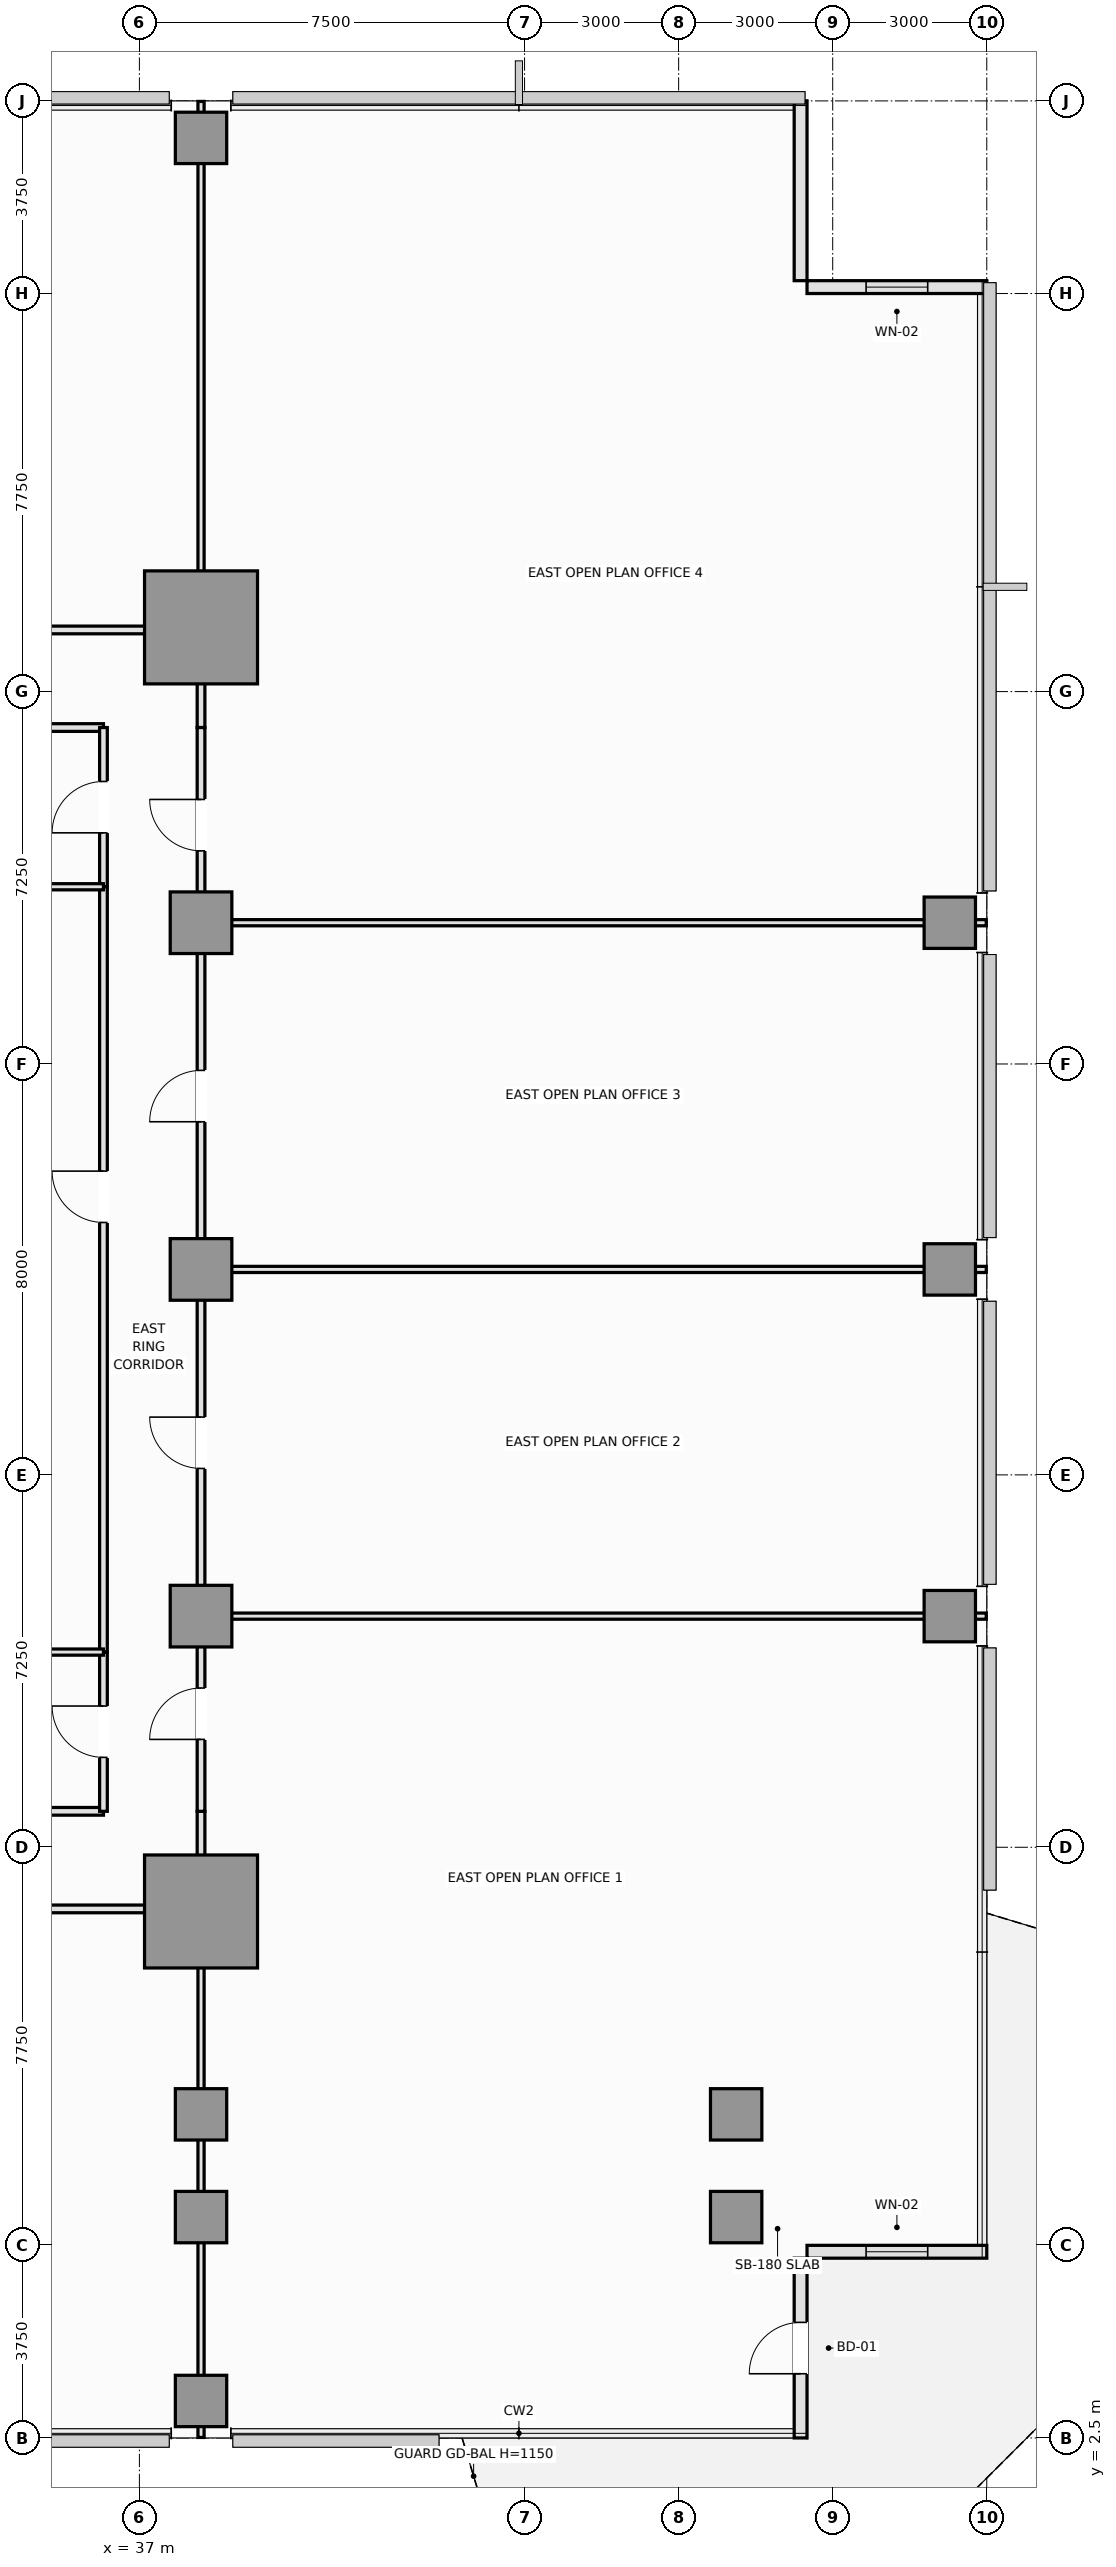
"""IFC4 building model, lengths in metres.
Left out: names, types, materials, properties, quantities, classifications, styles, units other than length and angle.
Written with IfcOpenShell. Run it as: python <this file> out.ifc"""

import sys

from ifc_helpers import new_model, si_unit, direction, frame, frame_2d, origin, origin_2d, place, context, subcontext, project, spatial, rectangle, extrude, element, fill, save


model = new_model("IFC4")
c1 = context("Model", 3, precision=1e-05, world=origin(), true_north=direction((0.0, 1.0)))
c2 = subcontext(c1, "Body", "Model", "MODEL_VIEW")
j1 = project(units=[si_unit("LENGTHUNIT", "METRE"), si_unit("PLANEANGLEUNIT", "RADIAN")], contexts=[c1])
p1 = place(None, origin())
s1 = spatial("IfcSite", under=j1, at=p1, CompositionType="ELEMENT")
p2 = place(p1, origin())
s2 = spatial("IfcBuilding", under=s1, at=p2, CompositionType="ELEMENT")
p3 = place(p2, frame((0.0, 0.0, 29.15)))
s3 = spatial("IfcBuildingStorey", under=s2, at=p3, CompositionType="ELEMENT", Elevation=29.15)
for number, where, z_axis, x_axis in (
    (1, (38.2, 12.75, 0.0), (0.0, 0.0, 1.0), (1.0, 0.0, 0.0)),
    (2, (38.2, 37.75, 0.0), (0.0, 0.0, 1.0), (1.0, 0.0, 0.0)),
):
    element("IfcColumn", number, at=place(p3, frame(where, z_axis=z_axis, x_axis=x_axis)), inside=s3, PredefinedType="COLUMN", context=c2, shape_type="SweptSolid", body=[
        extrude(rectangle(XDim=2.2, YDim=2.2, at=origin_2d()), origin(), (0.0, 0.0, 1.0), 3.55),
    ])
for number, where, z_axis, x_axis in (
    (3, (38.2, 18.5, 0.0), (0.0, 0.0, 1.0), (1.0, 0.0, 0.0)),
    (4, (38.2, 25.25, 0.0), (0.0, 0.0, 1.0), (1.0, 0.0, 0.0)),
    (5, (38.2, 32.0, 0.0), (0.0, 0.0, 1.0), (1.0, 0.0, 0.0)),
):
    element("IfcColumn", number, at=place(p3, frame(where, z_axis=z_axis, x_axis=x_axis)), inside=s3, PredefinedType="COLUMN", context=c2, shape_type="SweptSolid", body=[
        extrude(rectangle(XDim=1.2, YDim=1.2, at=origin_2d()), origin(), (0.0, 0.0, 1.0), 3.55),
    ])
for number, where, z_axis, x_axis in (
    (6, (48.62, 6.8, 0.0), (0.0, 0.0, 1.0), (1.0, 0.0, 0.0)),
    (7, (38.2, 6.8, 0.0), (0.0, 0.0, 1.0), (1.0, 0.0, 0.0)),
    (8, (38.2, 8.8, 0.0), (0.0, 0.0, 1.0), (1.0, 0.0, 0.0)),
    (9, (48.62, 8.8, 0.0), (0.0, 0.0, 1.0), (1.0, 0.0, 0.0)),
    (10, (52.78, 18.5, 0.0), (0.0, 0.0, 1.0), (1.0, 0.0, 0.0)),
    (11, (52.78, 25.25, 0.0), (0.0, 0.0, 1.0), (1.0, 0.0, 0.0)),
    (12, (52.78, 32.0, 0.0), (0.0, 0.0, 1.0), (1.0, 0.0, 0.0)),
    (13, (38.2, 3.22, 0.0), (0.0, 0.0, 1.0), (1.0, 0.0, 0.0)),
    (14, (38.2, 47.28, 0.0), (0.0, 0.0, 1.0), (1.0, 0.0, 0.0)),
):
    element("IfcColumn", number, at=place(p3, frame(where, z_axis=z_axis, x_axis=x_axis)), inside=s3, PredefinedType="COLUMN", context=c2, shape_type="SweptSolid", body=[
        extrude(rectangle(XDim=1.0, YDim=1.0, at=origin_2d()), origin(), (0.0, 0.0, 1.0), 3.55),
    ])
p4 = place(p3, frame((49.875, 2.5, 0.0), z_axis=(0.0, 0.0, 1.0), x_axis=(0.0, 1.0, 0.0)))
e15 = element("IfcWall", 15, at=p4, inside=s3, PredefinedType="SOLIDWALL", context=c2, shape_type="SweptSolid", body=[
    extrude(rectangle(XDim=3.5, YDim=0.25, at=frame_2d((1.75, 0.0))), origin(), (0.0, 0.0, 1.0), 3.07),
])
p5 = place(p4, frame((1.25, 0.0, 0.0)))
e16 = element("IfcOpeningElement", 16, at=p5, cuts=e15, PredefinedType="OPENING", context=c2, shape_type="SweptSolid", body=[
    extrude(rectangle(XDim=1.0, YDim=2.2, at=frame_2d((0.5, 1.1))), frame((0.0, 0.135, 0.0), z_axis=(0.0, -1.0, 0.0), x_axis=(1.0, 0.0, 0.0)), (0.0, 0.0, 1.0), 0.27),
])
p6 = place(p3, frame((50.0, 6.125, 0.0), z_axis=(0.0, 0.0, 1.0), x_axis=(1.0, 0.0, 0.0)))
e17 = element("IfcWall", 17, at=p6, inside=s3, PredefinedType="SOLIDWALL", context=c2, shape_type="SweptSolid", body=[
    extrude(rectangle(XDim=3.5, YDim=0.25, at=frame_2d((1.75, 0.0))), origin(), (0.0, 0.0, 1.0), 3.07),
])
p7 = place(p6, frame((1.15, 0.0, 0.9)))
e18 = element("IfcOpeningElement", 18, at=p7, cuts=e17, PredefinedType="OPENING", context=c2, shape_type="SweptSolid", body=[
    extrude(rectangle(XDim=1.2, YDim=1.8, at=frame_2d((0.6, 0.9))), frame((0.0, 0.135, 0.0), z_axis=(0.0, -1.0, 0.0), x_axis=(1.0, 0.0, 0.0)), (0.0, 0.0, 1.0), 0.27),
])
p8 = place(p3, frame((53.5, 44.375, 0.0), z_axis=(0.0, 0.0, 1.0), x_axis=(-1.0, 0.0, 0.0)))
e19 = element("IfcWall", 19, at=p8, inside=s3, PredefinedType="SOLIDWALL", context=c2, shape_type="SweptSolid", body=[
    extrude(rectangle(XDim=3.5, YDim=0.25, at=frame_2d((1.75, 0.0))), origin(), (0.0, 0.0, 1.0), 3.37),
])
p9 = place(p8, frame((1.15, 0.0, 0.9)))
e20 = element("IfcOpeningElement", 20, at=p9, cuts=e19, PredefinedType="OPENING", context=c2, shape_type="SweptSolid", body=[
    extrude(rectangle(XDim=1.2, YDim=1.8, at=frame_2d((0.6, 0.9))), frame((0.0, 0.135, 0.0), z_axis=(0.0, -1.0, 0.0), x_axis=(1.0, 0.0, 0.0)), (0.0, 0.0, 1.0), 0.27),
])
p10 = place(p3, frame((49.875, 44.5, 0.0), z_axis=(0.0, 0.0, 1.0), x_axis=(0.0, 1.0, 0.0)))
e21 = element("IfcWall", 21, at=p10, inside=s3, PredefinedType="SOLIDWALL", context=c2, shape_type="SweptSolid", body=[
    extrude(rectangle(XDim=3.5, YDim=0.25, at=frame_2d((1.75, 0.0))), origin(), (0.0, 0.0, 1.0), 3.37),
])
p11 = place(p3, frame((29.8, 14.7, 0.0), z_axis=(0.0, 0.0, 1.0), x_axis=(1.0, 0.0, 0.0)))
e22 = element("IfcWall", 22, at=p11, inside=s3, PredefinedType="PARTITIONING", context=c2, shape_type="SweptSolid", body=[
    extrude(rectangle(XDim=6.5, YDim=0.15, at=frame_2d((3.25, 0.0))), origin(), (0.0, 0.0, 1.0), 3.37),
])
p12 = place(p3, frame((27.5, 12.8, 0.0), z_axis=(0.0, 0.0, 1.0), x_axis=(1.0, 0.0, 0.0)))
e23 = element("IfcWall", 23, at=p12, inside=s3, PredefinedType="PARTITIONING", context=c2, shape_type="SweptSolid", body=[
    extrude(rectangle(XDim=10.7, YDim=0.15, at=frame_2d((5.35, 0.0))), origin(), (0.0, 0.0, 1.0), 2.72),
])
p13 = place(p12, frame((4.85, 0.0, 0.0)))
e24 = element("IfcOpeningElement", 24, at=p13, cuts=e23, PredefinedType="OPENING", context=c2, shape_type="SweptSolid", body=[
    extrude(rectangle(XDim=1.0, YDim=2.15, at=frame_2d((0.5, 1.075))), frame((0.0, 0.085, 0.0), z_axis=(0.0, -1.0, 0.0), x_axis=(1.0, 0.0, 0.0)), (0.0, 0.0, 1.0), 0.17),
])
p14 = place(p3, frame((38.2, 12.8, 0.0), z_axis=(0.0, 0.0, 1.0), x_axis=(0.0, 1.0, 0.0)))
e25 = element("IfcWall", 25, at=p14, inside=s3, PredefinedType="PARTITIONING", context=c2, shape_type="SweptSolid", body=[
    extrude(rectangle(XDim=1.9, YDim=0.15, at=frame_2d((0.95, 0.0))), origin(), (0.0, 0.0, 1.0), 2.82),
])
p15 = place(p3, frame((29.8, 35.8, 0.0), z_axis=(0.0, 0.0, 1.0), x_axis=(1.0, 0.0, 0.0)))
e26 = element("IfcWall", 26, at=p15, inside=s3, PredefinedType="PARTITIONING", context=c2, shape_type="SweptSolid", body=[
    extrude(rectangle(XDim=6.5, YDim=0.15, at=frame_2d((3.25, 0.0))), origin(), (0.0, 0.0, 1.0), 3.37),
])
p16 = place(p3, frame((27.5, 37.7, 0.0), z_axis=(0.0, 0.0, 1.0), x_axis=(1.0, 0.0, 0.0)))
e27 = element("IfcWall", 27, at=p16, inside=s3, PredefinedType="PARTITIONING", context=c2, shape_type="SweptSolid", body=[
    extrude(rectangle(XDim=10.7, YDim=0.15, at=frame_2d((5.35, 0.0))), origin(), (0.0, 0.0, 1.0), 2.72),
])
p17 = place(p16, frame((4.85, 0.0, 0.0)))
e28 = element("IfcOpeningElement", 28, at=p17, cuts=e27, PredefinedType="OPENING", context=c2, shape_type="SweptSolid", body=[
    extrude(rectangle(XDim=1.0, YDim=2.15, at=frame_2d((0.5, 1.075))), frame((0.0, 0.085, 0.0), z_axis=(0.0, -1.0, 0.0), x_axis=(1.0, 0.0, 0.0)), (0.0, 0.0, 1.0), 0.17),
])
p18 = place(p3, frame((38.2, 35.8, 0.0), z_axis=(0.0, 0.0, 1.0), x_axis=(0.0, 1.0, 0.0)))
e29 = element("IfcWall", 29, at=p18, inside=s3, PredefinedType="PARTITIONING", context=c2, shape_type="SweptSolid", body=[
    extrude(rectangle(XDim=1.9, YDim=0.15, at=frame_2d((0.95, 0.0))), origin(), (0.0, 0.0, 1.0), 2.82),
])
p19 = place(p3, frame((36.3, 14.7, 0.0), z_axis=(0.0, 0.0, 1.0), x_axis=(0.0, 1.0, 0.0)))
e30 = element("IfcWall", 30, at=p19, inside=s3, PredefinedType="PARTITIONING", context=c2, shape_type="SweptSolid", body=[
    extrude(rectangle(XDim=3.1, YDim=0.15, at=frame_2d((1.55, 0.0))), origin(), (0.0, 0.0, 1.0), 3.37),
])
p20 = place(p19, frame((1.05, 0.0, 0.0)))
e31 = element("IfcOpeningElement", 31, at=p20, cuts=e30, PredefinedType="OPENING", context=c2, shape_type="SweptSolid", body=[
    extrude(rectangle(XDim=1.0, YDim=2.15, at=frame_2d((0.5, 1.075))), frame((0.0, 0.085, 0.0), z_axis=(0.0, -1.0, 0.0), x_axis=(1.0, 0.0, 0.0)), (0.0, 0.0, 1.0), 0.17),
])
p21 = place(p3, frame((36.3, 32.7, 0.0), z_axis=(0.0, 0.0, 1.0), x_axis=(0.0, 1.0, 0.0)))
e32 = element("IfcWall", 32, at=p21, inside=s3, PredefinedType="PARTITIONING", context=c2, shape_type="SweptSolid", body=[
    extrude(rectangle(XDim=3.1, YDim=0.15, at=frame_2d((1.55, 0.0))), origin(), (0.0, 0.0, 1.0), 3.37),
])
p22 = place(p21, frame((1.05, 0.0, 0.0)))
e33 = element("IfcOpeningElement", 33, at=p22, cuts=e32, PredefinedType="OPENING", context=c2, shape_type="SweptSolid", body=[
    extrude(rectangle(XDim=1.0, YDim=2.15, at=frame_2d((0.5, 1.075))), frame((0.0, 0.085, 0.0), z_axis=(0.0, -1.0, 0.0), x_axis=(1.0, 0.0, 0.0)), (0.0, 0.0, 1.0), 0.17),
])
p23 = place(p3, frame((36.3, 17.8, 0.0), z_axis=(0.0, 0.0, 1.0), x_axis=(0.0, 1.0, 0.0)))
e34 = element("IfcWall", 34, at=p23, inside=s3, PredefinedType="PARTITIONING", context=c2, shape_type="SweptSolid", body=[
    extrude(rectangle(XDim=14.9, YDim=0.15, at=frame_2d((7.45, 0.0))), origin(), (0.0, 0.0, 1.0), 3.37),
])
p24 = place(p23, frame((8.364, 0.0, 0.0)))
e35 = element("IfcOpeningElement", 35, at=p24, cuts=e34, PredefinedType="OPENING", context=c2, shape_type="SweptSolid", body=[
    extrude(rectangle(XDim=1.0, YDim=2.15, at=frame_2d((0.5, 1.075))), frame((0.0, 0.085, 0.0), z_axis=(0.0, -1.0, 0.0), x_axis=(1.0, 0.0, 0.0)), (0.0, 0.0, 1.0), 0.17),
])
p25 = place(p3, frame((38.2, 14.7, 0.0), z_axis=(0.0, 0.0, 1.0), x_axis=(0.0, 1.0, 0.0)))
e36 = element("IfcWall", 36, at=p25, inside=s3, PredefinedType="PARTITIONING", context=c2, shape_type="SweptSolid", body=[
    extrude(rectangle(XDim=3.8, YDim=0.15, at=frame_2d((1.9, 0.0))), origin(), (0.0, 0.0, 1.0), 2.82),
])
p26 = place(p25, frame((1.4, 0.0, 0.0)))
e37 = element("IfcOpeningElement", 37, at=p26, cuts=e36, PredefinedType="OPENING", context=c2, shape_type="SweptSolid", body=[
    extrude(rectangle(XDim=1.0, YDim=2.15, at=frame_2d((0.5, 1.075))), frame((0.0, 0.085, 0.0), z_axis=(0.0, -1.0, 0.0), x_axis=(1.0, 0.0, 0.0)), (0.0, 0.0, 1.0), 0.17),
])
p27 = place(p3, frame((38.2, 18.5, 0.0), z_axis=(0.0, 0.0, 1.0), x_axis=(0.0, 1.0, 0.0)))
e38 = element("IfcWall", 38, at=p27, inside=s3, PredefinedType="PARTITIONING", context=c2, shape_type="SweptSolid", body=[
    extrude(rectangle(XDim=6.75, YDim=0.15, at=frame_2d((3.375, 0.0))), origin(), (0.0, 0.0, 1.0), 2.82),
])
p28 = place(p27, frame((2.875, 0.0, 0.0)))
e39 = element("IfcOpeningElement", 39, at=p28, cuts=e38, PredefinedType="OPENING", context=c2, shape_type="SweptSolid", body=[
    extrude(rectangle(XDim=1.0, YDim=2.15, at=frame_2d((0.5, 1.075))), frame((0.0, 0.085, 0.0), z_axis=(0.0, -1.0, 0.0), x_axis=(1.0, 0.0, 0.0)), (0.0, 0.0, 1.0), 0.17),
])
p29 = place(p3, frame((38.2, 25.25, 0.0), z_axis=(0.0, 0.0, 1.0), x_axis=(0.0, 1.0, 0.0)))
e40 = element("IfcWall", 40, at=p29, inside=s3, PredefinedType="PARTITIONING", context=c2, shape_type="SweptSolid", body=[
    extrude(rectangle(XDim=6.75, YDim=0.15, at=frame_2d((3.375, 0.0))), origin(), (0.0, 0.0, 1.0), 2.82),
])
p30 = place(p29, frame((2.875, 0.0, 0.0)))
e41 = element("IfcOpeningElement", 41, at=p30, cuts=e40, PredefinedType="OPENING", context=c2, shape_type="SweptSolid", body=[
    extrude(rectangle(XDim=1.0, YDim=2.15, at=frame_2d((0.5, 1.075))), frame((0.0, 0.085, 0.0), z_axis=(0.0, -1.0, 0.0), x_axis=(1.0, 0.0, 0.0)), (0.0, 0.0, 1.0), 0.17),
])
p31 = place(p3, frame((38.2, 32.0, 0.0), z_axis=(0.0, 0.0, 1.0), x_axis=(0.0, 1.0, 0.0)))
e42 = element("IfcWall", 42, at=p31, inside=s3, PredefinedType="PARTITIONING", context=c2, shape_type="SweptSolid", body=[
    extrude(rectangle(XDim=3.8, YDim=0.15, at=frame_2d((1.9, 0.0))), origin(), (0.0, 0.0, 1.0), 2.82),
])
p32 = place(p31, frame((1.4, 0.0, 0.0)))
e43 = element("IfcOpeningElement", 43, at=p32, cuts=e42, PredefinedType="OPENING", context=c2, shape_type="SweptSolid", body=[
    extrude(rectangle(XDim=1.0, YDim=2.15, at=frame_2d((0.5, 1.075))), frame((0.0, 0.085, 0.0), z_axis=(0.0, -1.0, 0.0), x_axis=(1.0, 0.0, 0.0)), (0.0, 0.0, 1.0), 0.17),
])
for number, where, z_axis, x_axis in (
    (44, (29.8, 17.8, 0.0), (0.0, 0.0, 1.0), (1.0, 0.0, 0.0)),
    (45, (29.8, 32.7, 0.0), (0.0, 0.0, 1.0), (1.0, 0.0, 0.0)),
):
    element("IfcWall", number, at=place(p3, frame(where, z_axis=z_axis, x_axis=x_axis)), inside=s3, PredefinedType="PARTITIONING", context=c2, shape_type="SweptSolid", body=[
        extrude(rectangle(XDim=6.5, YDim=0.12, at=frame_2d((3.25, 0.0))), origin(), (0.0, 0.0, 1.0), 3.37),
    ])
for number, where, z_axis, x_axis in (
    (46, (38.2, 2.51, 0.0), (0.0, 0.0, 1.0), (0.0, 1.0, 0.0)),
    (47, (38.2, 37.7, 0.0), (0.0, 0.0, 1.0), (0.0, 1.0, 0.0)),
):
    element("IfcWall", number, at=place(p3, frame(where, z_axis=z_axis, x_axis=x_axis)), inside=s3, PredefinedType="PARTITIONING", context=c2, shape_type="SweptSolid", body=[
        extrude(rectangle(XDim=10.29, YDim=0.12, at=frame_2d((5.145, 0.0))), origin(), (0.0, 0.0, 1.0), 2.82),
    ])
for number, where, z_axis, x_axis in (
    (48, (38.2, 18.5, 0.0), (0.0, 0.0, 1.0), (1.0, 0.0, 0.0)),
    (49, (38.2, 25.25, 0.0), (0.0, 0.0, 1.0), (1.0, 0.0, 0.0)),
    (50, (38.2, 32.0, 0.0), (0.0, 0.0, 1.0), (1.0, 0.0, 0.0)),
):
    element("IfcWall", number, at=place(p3, frame(where, z_axis=z_axis, x_axis=x_axis)), inside=s3, PredefinedType="PARTITIONING", context=c2, shape_type="SweptSolid", body=[
        extrude(rectangle(XDim=15.29, YDim=0.12, at=frame_2d((7.645, 0.0))), origin(), (0.0, 0.0, 1.0), 2.72),
    ])
p33 = place(p5, frame((1.0, 0.0, 0.0), z_axis=(0.0, 0.0, 1.0), x_axis=(-1.0, 0.0, 0.0)))
e51 = element("IfcDoor", 51, at=p33, inside=s3, OperationType="SINGLE_SWING_LEFT", PredefinedType="DOOR", context=c2, shape_type="SweptSolid", body=[
    extrude(rectangle(XDim=1.0, YDim=2.2, at=frame_2d((0.5, 1.1))), frame((0.0, 0.025, 0.0), z_axis=(0.0, -1.0, 0.0), x_axis=(1.0, 0.0, 0.0)), (0.0, 0.0, 1.0), 0.05),
])
fill(e16, e51)
p34 = place(p7, origin())
e52 = element("IfcWindow", 52, at=p34, inside=s3, PartitioningType="SINGLE_PANEL", PredefinedType="WINDOW", context=c2, shape_type="SweptSolid", body=[
    extrude(rectangle(XDim=1.2, YDim=1.8, at=frame_2d((0.6, 0.9))), frame((0.0, 0.03, 0.0), z_axis=(0.0, -1.0, 0.0), x_axis=(1.0, 0.0, 0.0)), (0.0, 0.0, 1.0), 0.06),
])
fill(e18, e52)
p35 = place(p9, origin())
e53 = element("IfcWindow", 53, at=p35, inside=s3, PartitioningType="SINGLE_PANEL", PredefinedType="WINDOW", context=c2, shape_type="SweptSolid", body=[
    extrude(rectangle(XDim=1.2, YDim=1.8, at=frame_2d((0.6, 0.9))), frame((0.0, 0.03, 0.0), z_axis=(0.0, -1.0, 0.0), x_axis=(1.0, 0.0, 0.0)), (0.0, 0.0, 1.0), 0.06),
])
fill(e20, e53)
p36 = place(p20, origin())
e54 = element("IfcDoor", 54, at=p36, inside=s3, OperationType="SINGLE_SWING_RIGHT", PredefinedType="DOOR", context=c2, shape_type="SweptSolid", body=[
    extrude(rectangle(XDim=1.0, YDim=2.15, at=frame_2d((0.5, 1.075))), frame((0.0, 0.025, 0.0), z_axis=(0.0, -1.0, 0.0), x_axis=(1.0, 0.0, 0.0)), (0.0, 0.0, 1.0), 0.05),
])
fill(e31, e54)
p37 = place(p22, origin())
e55 = element("IfcDoor", 55, at=p37, inside=s3, OperationType="SINGLE_SWING_LEFT", PredefinedType="DOOR", context=c2, shape_type="SweptSolid", body=[
    extrude(rectangle(XDim=1.0, YDim=2.15, at=frame_2d((0.5, 1.075))), frame((0.0, 0.025, 0.0), z_axis=(0.0, -1.0, 0.0), x_axis=(1.0, 0.0, 0.0)), (0.0, 0.0, 1.0), 0.05),
])
fill(e33, e55)
p38 = place(p24, origin())
e56 = element("IfcDoor", 56, at=p38, inside=s3, OperationType="SINGLE_SWING_RIGHT", PredefinedType="DOOR", context=c2, shape_type="SweptSolid", body=[
    extrude(rectangle(XDim=1.0, YDim=2.15, at=frame_2d((0.5, 1.075))), frame((0.0, 0.025, 0.0), z_axis=(0.0, -1.0, 0.0), x_axis=(1.0, 0.0, 0.0)), (0.0, 0.0, 1.0), 0.05),
])
fill(e35, e56)
p39 = place(p26, origin())
e57 = element("IfcDoor", 57, at=p39, inside=s3, OperationType="SINGLE_SWING_LEFT", PredefinedType="DOOR", context=c2, shape_type="SweptSolid", body=[
    extrude(rectangle(XDim=1.0, YDim=2.15, at=frame_2d((0.5, 1.075))), frame((0.0, 0.025, 0.0), z_axis=(0.0, -1.0, 0.0), x_axis=(1.0, 0.0, 0.0)), (0.0, 0.0, 1.0), 0.05),
])
fill(e37, e57)
p40 = place(p28, origin())
e58 = element("IfcDoor", 58, at=p40, inside=s3, OperationType="SINGLE_SWING_RIGHT", PredefinedType="DOOR", context=c2, shape_type="SweptSolid", body=[
    extrude(rectangle(XDim=1.0, YDim=2.15, at=frame_2d((0.5, 1.075))), frame((0.0, 0.025, 0.0), z_axis=(0.0, -1.0, 0.0), x_axis=(1.0, 0.0, 0.0)), (0.0, 0.0, 1.0), 0.05),
])
fill(e39, e58)
p41 = place(p30, origin())
e59 = element("IfcDoor", 59, at=p41, inside=s3, OperationType="SINGLE_SWING_LEFT", PredefinedType="DOOR", context=c2, shape_type="SweptSolid", body=[
    extrude(rectangle(XDim=1.0, YDim=2.15, at=frame_2d((0.5, 1.075))), frame((0.0, 0.025, 0.0), z_axis=(0.0, -1.0, 0.0), x_axis=(1.0, 0.0, 0.0)), (0.0, 0.0, 1.0), 0.05),
])
fill(e41, e59)
p42 = place(p32, origin())
e60 = element("IfcDoor", 60, at=p42, inside=s3, OperationType="SINGLE_SWING_RIGHT", PredefinedType="DOOR", context=c2, shape_type="SweptSolid", body=[
    extrude(rectangle(XDim=1.0, YDim=2.15, at=frame_2d((0.5, 1.075))), frame((0.0, 0.025, 0.0), z_axis=(0.0, -1.0, 0.0), x_axis=(1.0, 0.0, 0.0)), (0.0, 0.0, 1.0), 0.05),
])
fill(e43, e60)
save(model, sys.argv[1])
